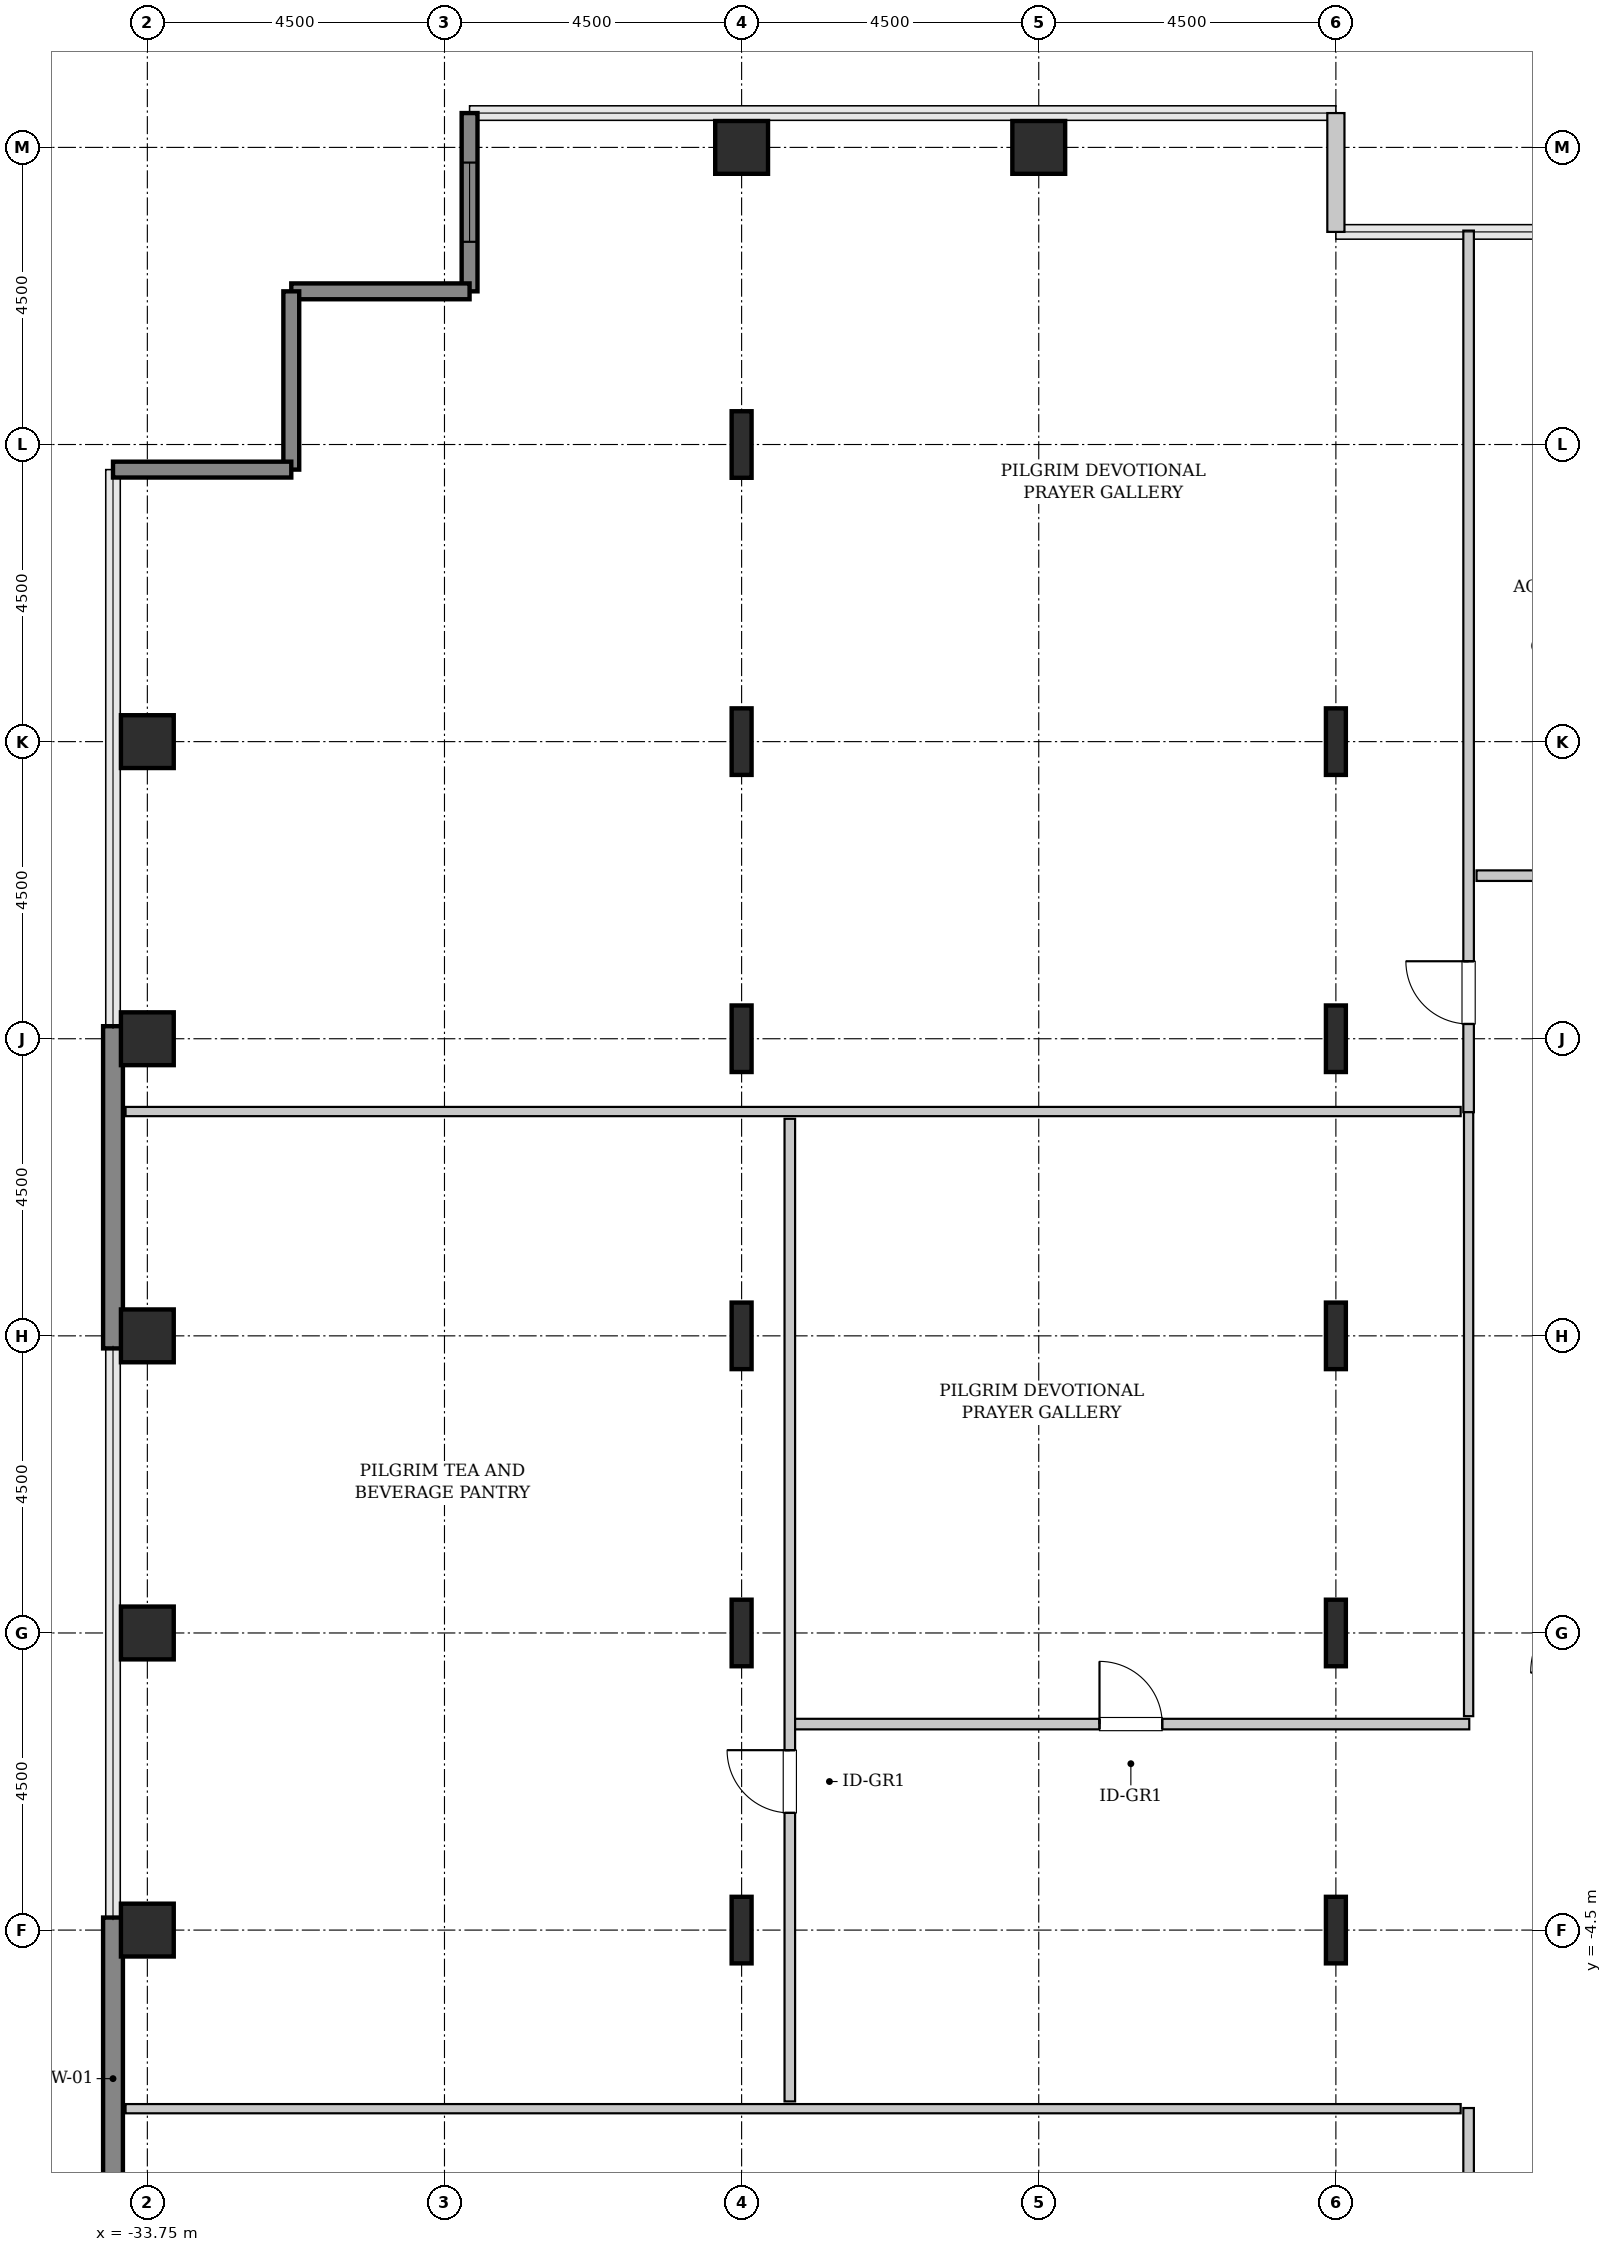
"""IFC4 building model, lengths in metres.
Left out: names, types, materials, properties, quantities, classifications, styles, units other than length and angle.
Written with IfcOpenShell. Run it as: python <this file> out.ifc"""

import sys

from ifc_helpers import new_model, si_unit, direction, frame, frame_2d, origin, origin_2d, place, context, subcontext, project, spatial, rectangle, hollow_rectangle, i_section, extrude, source, transform, mapped, element, fill, save


model = new_model("IFC4")
c1 = context("Model", 3, precision=1e-05, world=origin(), true_north=direction((0.0, 1.0)))
c2 = subcontext(c1, "Body", "Model", "MODEL_VIEW")
j1 = project(units=[si_unit("LENGTHUNIT", "METRE"), si_unit("PLANEANGLEUNIT", "RADIAN")], contexts=[c1])
p1 = place(None, origin())
s1 = spatial("IfcSite", under=j1, at=p1, CompositionType="ELEMENT")
p2 = place(p1, origin())
s2 = spatial("IfcBuilding", under=s1, at=p2, CompositionType="ELEMENT")
p3 = place(p2, frame((0.0, 0.0, 136.4)))
s3 = spatial("IfcBuildingStorey", under=s2, at=p3, CompositionType="ELEMENT", Elevation=136.4)
m1 = source(origin(), c2, "Body", "SweptSolid", [
    extrude(hollow_rectangle(XDim=0.8, YDim=0.8, WallThickness=0.04, InnerFilletRadius=0.04, OuterFilletRadius=0.08, at=origin_2d()), origin(), (0.0, 0.0, 1.0), 3.8),
])
for number, where, z_axis, x_axis in (
    (1, (-33.75, -4.5, 0.0), (0.0, 0.0, 1.0), (1.0, 0.0, 0.0)),
    (2, (-33.75, 0.0, 0.0), (0.0, 0.0, 1.0), (1.0, 0.0, 0.0)),
    (3, (-33.75, 4.5, 0.0), (0.0, 0.0, 1.0), (1.0, 0.0, 0.0)),
    (4, (-33.75, 9.0, 0.0), (0.0, 0.0, 1.0), (1.0, 0.0, 0.0)),
    (5, (-33.75, 13.5, 0.0), (0.0, 0.0, 1.0), (1.0, 0.0, 0.0)),
):
    element("IfcColumn", number, at=place(p3, frame(where, z_axis=z_axis, x_axis=x_axis)), inside=s3, PredefinedType="COLUMN", context=c2, shape_type="MappedRepresentation", body=[
        mapped(m1, transform((0.0, 0.0, 0.0), x_axis=(1.0, 0.0, 0.0), y_axis=(0.0, 1.0, 0.0), z_axis=(0.0, 0.0, 1.0), scale=1.0)),
    ])
m2 = source(origin(), c2, "Body", "SweptSolid", [
    extrude(i_section(OverallWidth=0.302, OverallDepth=1.008, WebThickness=0.021, FlangeThickness=0.04, FilletRadius=0.03, at=origin_2d()), origin(), (0.0, 0.0, 1.0), 3.8),
])
for number, where, z_axis, x_axis in (
    (6, (-24.75, -4.5, 0.0), (0.0, 0.0, 1.0), (1.0, 0.0, 0.0)),
    (7, (-24.75, 0.0, 0.0), (0.0, 0.0, 1.0), (1.0, 0.0, 0.0)),
    (8, (-24.75, 4.5, 0.0), (0.0, 0.0, 1.0), (1.0, 0.0, 0.0)),
    (9, (-24.75, 9.0, 0.0), (0.0, 0.0, 1.0), (1.0, 0.0, 0.0)),
    (10, (-24.75, 13.5, 0.0), (0.0, 0.0, 1.0), (1.0, 0.0, 0.0)),
    (11, (-24.75, 18.0, 0.0), (0.0, 0.0, 1.0), (1.0, 0.0, 0.0)),
):
    element("IfcColumn", number, at=place(p3, frame(where, z_axis=z_axis, x_axis=x_axis)), inside=s3, PredefinedType="COLUMN", context=c2, shape_type="MappedRepresentation", body=[
        mapped(m2, transform((0.0, 0.0, 0.0), x_axis=(1.0, 0.0, 0.0), y_axis=(0.0, 1.0, 0.0), z_axis=(0.0, 0.0, 1.0), scale=1.0)),
    ])
for number, where, z_axis, x_axis in (
    (12, (-24.75, 22.5, 0.0), (0.0, 0.0, 1.0), (1.0, 0.0, 0.0)),
    (13, (-20.25, 22.5, 0.0), (0.0, 0.0, 1.0), (1.0, 0.0, 0.0)),
):
    element("IfcColumn", number, at=place(p3, frame(where, z_axis=z_axis, x_axis=x_axis)), inside=s3, PredefinedType="COLUMN", context=c2, shape_type="MappedRepresentation", body=[
        mapped(m1, transform((0.0, 0.0, 0.0), x_axis=(1.0, 0.0, 0.0), y_axis=(0.0, 1.0, 0.0), z_axis=(0.0, 0.0, 1.0), scale=1.0)),
    ])
for number, where, z_axis, x_axis in (
    (14, (-15.75, -4.5, 0.0), (0.0, 0.0, 1.0), (1.0, 0.0, 0.0)),
    (15, (-15.75, 0.0, 0.0), (0.0, 0.0, 1.0), (1.0, 0.0, 0.0)),
    (16, (-15.75, 4.5, 0.0), (0.0, 0.0, 1.0), (1.0, 0.0, 0.0)),
    (17, (-15.75, 9.0, 0.0), (0.0, 0.0, 1.0), (1.0, 0.0, 0.0)),
    (18, (-15.75, 13.5, 0.0), (0.0, 0.0, 1.0), (1.0, 0.0, 0.0)),
):
    element("IfcColumn", number, at=place(p3, frame(where, z_axis=z_axis, x_axis=x_axis)), inside=s3, PredefinedType="COLUMN", context=c2, shape_type="MappedRepresentation", body=[
        mapped(m2, transform((0.0, 0.0, 0.0), x_axis=(1.0, 0.0, 0.0), y_axis=(0.0, 1.0, 0.0), z_axis=(0.0, 0.0, 1.0), scale=1.0)),
    ])
m3 = source(origin(), c2, "Body", "SweptSolid", [
    extrude(rectangle(XDim=4.88, YDim=0.3, at=frame_2d((2.44, 0.0))), origin(), (0.0, 0.0, 1.0), 3.55),
])
for number, where, z_axis, x_axis in (
    (19, (-34.27, -9.19, 0.0), (0.0, 0.0, 1.0), (0.0, 1.0, 0.0)),
    (20, (-34.27, 4.31, 0.0), (0.0, 0.0, 1.0), (0.0, 1.0, 0.0)),
):
    element("IfcWall", number, at=place(p3, frame(where, z_axis=z_axis, x_axis=x_axis)), inside=s3, PredefinedType="SHEAR", context=c2, shape_type="MappedRepresentation", body=[
        mapped(m3, transform((0.0, 0.0, 0.0), x_axis=(1.0, 0.0, 0.0), y_axis=(0.0, 1.0, 0.0), z_axis=(0.0, 0.0, 1.0), scale=1.0)),
    ])
m4 = source(origin(), c2, "Body", "SweptSolid", [
    extrude(rectangle(XDim=1.8, YDim=0.26, at=frame_2d((0.9, 0.0))), origin(), (0.0, 0.0, 1.0), 3.55),
])
p4 = place(p3, frame((-15.75, 21.22, 0.0), z_axis=(0.0, 0.0, 1.0), x_axis=(0.0, 1.0, 0.0)))
e21 = element("IfcWall", 21, at=p4, inside=s3, PredefinedType="SOLIDWALL", context=c2, shape_type="MappedRepresentation", body=[
    mapped(m4, transform((0.0, 0.0, 0.0), x_axis=(1.0, 0.0, 0.0), y_axis=(0.0, 1.0, 0.0), z_axis=(0.0, 0.0, 1.0), scale=1.0)),
])
m5 = source(origin(), c2, "Body", "SweptSolid", [
    extrude(rectangle(XDim=2.7, YDim=0.24, at=frame_2d((1.35, 0.0))), origin(), (0.0, 0.0, 1.0), 3.55),
])
p5 = place(p3, frame((-28.87, 23.02, 0.0), z_axis=(0.0, 0.0, 1.0), x_axis=(0.0, -1.0, 0.0)))
e22 = element("IfcWall", 22, at=p5, inside=s3, PredefinedType="SHEAR", context=c2, shape_type="MappedRepresentation", body=[
    mapped(m5, transform((0.0, 0.0, 0.0), x_axis=(1.0, 0.0, 0.0), y_axis=(0.0, 1.0, 0.0), z_axis=(0.0, 0.0, 1.0), scale=1.0)),
])
p6 = place(p5, frame((0.75, 0.0, 0.85)))
e23 = element("IfcOpeningElement", 23, at=p6, cuts=e22, PredefinedType="OPENING", context=c2, shape_type="SweptSolid", body=[
    extrude(rectangle(XDim=1.2, YDim=1.8, at=frame_2d((0.6, 0.9))), frame((0.0, 0.13, 0.0), z_axis=(0.0, -1.0, 0.0), x_axis=(1.0, 0.0, 0.0)), (0.0, 0.0, 1.0), 0.26),
])
for number, where, z_axis, x_axis in (
    (24, (-28.87, 20.32, 0.0), (0.0, 0.0, 1.0), (-1.0, 0.0, 0.0)),
    (25, (-31.57, 20.32, 0.0), (0.0, 0.0, 1.0), (0.0, -1.0, 0.0)),
    (26, (-31.57, 17.62, 0.0), (0.0, 0.0, 1.0), (-1.0, 0.0, 0.0)),
):
    element("IfcWall", number, at=place(p3, frame(where, z_axis=z_axis, x_axis=x_axis)), inside=s3, PredefinedType="SHEAR", context=c2, shape_type="MappedRepresentation", body=[
        mapped(m5, transform((0.0, 0.0, 0.0), x_axis=(1.0, 0.0, 0.0), y_axis=(0.0, 1.0, 0.0), z_axis=(0.0, 0.0, 1.0), scale=1.0)),
    ])
m6 = source(origin(), c2, "Body", "SweptSolid", [
    extrude(rectangle(XDim=14.045, YDim=0.16, at=frame_2d((7.022, 0.0))), origin(), (0.0, 0.0, 1.0), 3.535),
])
p7 = place(p3, frame((-13.74, -21.24, 0.0), z_axis=(0.0, 0.0, 1.0), x_axis=(0.0, 1.0, 0.0)))
e27 = element("IfcWall", 27, at=p7, inside=s3, PredefinedType="PARTITIONING", context=c2, shape_type="MappedRepresentation", body=[
    mapped(m6, transform((0.0, 0.0, 0.0), x_axis=(1.0, 0.0, 0.0), y_axis=(0.0, 1.0, 0.0), z_axis=(0.0, 0.0, 1.0), scale=1.0)),
])
p8 = place(p7, frame((11.413, 0.0, 0.0)))
e28 = element("IfcOpeningElement", 28, at=p8, cuts=e27, PredefinedType="OPENING", context=c2, shape_type="SweptSolid", body=[
    extrude(rectangle(XDim=0.95, YDim=2.1, at=frame_2d((0.475, 1.05))), frame((0.0, 0.09, 0.0), z_axis=(0.0, -1.0, 0.0), x_axis=(1.0, 0.0, 0.0)), (0.0, 0.0, 1.0), 0.18),
])
m7 = source(origin(), c2, "Body", "SweptSolid", [
    extrude(rectangle(XDim=20.22, YDim=0.14, at=frame_2d((10.11, 0.0))), origin(), (0.0, 0.0, 1.0), 3.535),
])
p9 = place(p3, frame((-34.08, -7.205, 0.0), z_axis=(0.0, 0.0, 1.0), x_axis=(1.0, 0.0, 0.0)))
e29 = element("IfcWall", 29, at=p9, inside=s3, PredefinedType="PARTITIONING", context=c2, shape_type="MappedRepresentation", body=[
    mapped(m7, transform((0.0, 0.0, 0.0), x_axis=(1.0, 0.0, 0.0), y_axis=(0.0, 1.0, 0.0), z_axis=(0.0, 0.0, 1.0), scale=1.0)),
])
m8 = source(origin(), c2, "Body", "SweptSolid", [
    extrude(rectangle(XDim=13.353, YDim=0.16, at=frame_2d((6.676, 0.0))), origin(), (0.0, 0.0, 1.0), 3.535),
])
p10 = place(p3, frame((-13.74, 7.887, 0.0), z_axis=(0.0, 0.0, 1.0), x_axis=(0.0, 1.0, 0.0)))
e30 = element("IfcWall", 30, at=p10, inside=s3, PredefinedType="PARTITIONING", context=c2, shape_type="MappedRepresentation", body=[
    mapped(m8, transform((0.0, 0.0, 0.0), x_axis=(1.0, 0.0, 0.0), y_axis=(0.0, 1.0, 0.0), z_axis=(0.0, 0.0, 1.0), scale=1.0)),
])
p11 = place(p10, frame((1.336, 0.0, 0.0)))
e31 = element("IfcOpeningElement", 31, at=p11, cuts=e30, PredefinedType="OPENING", context=c2, shape_type="SweptSolid", body=[
    extrude(rectangle(XDim=0.95, YDim=2.1, at=frame_2d((0.475, 1.05))), frame((0.0, 0.09, 0.0), z_axis=(0.0, -1.0, 0.0), x_axis=(1.0, 0.0, 0.0)), (0.0, 0.0, 1.0), 0.18),
])
p12 = place(p3, frame((-34.08, 7.897, 0.0), z_axis=(0.0, 0.0, 1.0), x_axis=(1.0, 0.0, 0.0)))
e32 = element("IfcWall", 32, at=p12, inside=s3, PredefinedType="PARTITIONING", context=c2, shape_type="MappedRepresentation", body=[
    mapped(m7, transform((0.0, 0.0, 0.0), x_axis=(1.0, 0.0, 0.0), y_axis=(0.0, 1.0, 0.0), z_axis=(0.0, 0.0, 1.0), scale=1.0)),
])
m9 = source(origin(), c2, "Body", "SweptSolid", [
    extrude(rectangle(XDim=10.25, YDim=0.16, at=frame_2d((5.125, 0.0))), origin(), (0.0, 0.0, 1.0), 3.535),
])
p13 = place(p3, frame((-23.98, -1.38, 0.0), z_axis=(0.0, 0.0, 1.0), x_axis=(1.0, 0.0, 0.0)))
e33 = element("IfcWall", 33, at=p13, inside=s3, PredefinedType="PARTITIONING", context=c2, shape_type="MappedRepresentation", body=[
    mapped(m9, transform((0.0, 0.0, 0.0), x_axis=(1.0, 0.0, 0.0), y_axis=(0.0, 1.0, 0.0), z_axis=(0.0, 0.0, 1.0), scale=1.0)),
])
p14 = place(p13, frame((4.65, 0.0, 0.0)))
e34 = element("IfcOpeningElement", 34, at=p14, cuts=e33, PredefinedType="OPENING", context=c2, shape_type="SweptSolid", body=[
    extrude(rectangle(XDim=0.95, YDim=2.1, at=frame_2d((0.475, 1.05))), frame((0.0, 0.09, 0.0), z_axis=(0.0, -1.0, 0.0), x_axis=(1.0, 0.0, 0.0)), (0.0, 0.0, 1.0), 0.18),
])
m10 = source(origin(), c2, "Body", "SweptSolid", [
    extrude(rectangle(XDim=9.147, YDim=0.14, at=frame_2d((4.574, 0.0))), origin(), (0.0, 0.0, 1.0), 3.535),
])
p15 = place(p3, frame((-13.74, -1.26, 0.0), z_axis=(0.0, 0.0, 1.0), x_axis=(0.0, 1.0, 0.0)))
e35 = element("IfcWall", 35, at=p15, inside=s3, PredefinedType="PARTITIONING", context=c2, shape_type="MappedRepresentation", body=[
    mapped(m10, transform((0.0, 0.0, 0.0), x_axis=(1.0, 0.0, 0.0), y_axis=(0.0, 1.0, 0.0), z_axis=(0.0, 0.0, 1.0), scale=1.0)),
])
m11 = source(origin(), c2, "Body", "SweptSolid", [
    extrude(rectangle(XDim=14.883, YDim=0.16, at=frame_2d((7.441, 0.0))), origin(), (0.0, 0.0, 1.0), 3.535),
])
p16 = place(p3, frame((-24.02, -7.095, 0.0), z_axis=(0.0, 0.0, 1.0), x_axis=(0.0, 1.0, 0.0)))
e36 = element("IfcWall", 36, at=p16, inside=s3, PredefinedType="PARTITIONING", context=c2, shape_type="MappedRepresentation", body=[
    mapped(m11, transform((0.0, 0.0, 0.0), x_axis=(1.0, 0.0, 0.0), y_axis=(0.0, 1.0, 0.0), z_axis=(0.0, 0.0, 1.0), scale=1.0)),
])
p17 = place(p16, frame((4.37, 0.0, 0.0)))
e37 = element("IfcOpeningElement", 37, at=p17, cuts=e36, PredefinedType="OPENING", context=c2, shape_type="SweptSolid", body=[
    extrude(rectangle(XDim=0.95, YDim=2.1, at=frame_2d((0.475, 1.05))), frame((0.0, 0.09, 0.0), z_axis=(0.0, -1.0, 0.0), x_axis=(1.0, 0.0, 0.0)), (0.0, 0.0, 1.0), 0.18),
])
m12 = source(origin(), c2, "Body", "SweptSolid", [
    extrude(rectangle(XDim=4.125, YDim=0.16, at=frame_2d((2.062, 0.0))), origin(), (0.0, 0.0, 1.0), 3.535),
])
p18 = place(p3, frame((-13.62, 11.47, 0.0), z_axis=(0.0, 0.0, 1.0), x_axis=(1.0, 0.0, 0.0)))
e38 = element("IfcWall", 38, at=p18, inside=s3, PredefinedType="PARTITIONING", context=c2, shape_type="MappedRepresentation", body=[
    mapped(m12, transform((0.0, 0.0, 0.0), x_axis=(1.0, 0.0, 0.0), y_axis=(0.0, 1.0, 0.0), z_axis=(0.0, 0.0, 1.0), scale=1.0)),
])
p19 = place(p18, frame((1.587, 0.0, 0.0)))
e39 = element("IfcOpeningElement", 39, at=p19, cuts=e38, PredefinedType="OPENING", context=c2, shape_type="SweptSolid", body=[
    extrude(rectangle(XDim=0.95, YDim=2.1, at=frame_2d((0.475, 1.05))), frame((0.0, 0.09, 0.0), z_axis=(0.0, -1.0, 0.0), x_axis=(1.0, 0.0, 0.0)), (0.0, 0.0, 1.0), 0.18),
])
m13 = source(origin(), c2, "Body", "SweptSolid", [
    extrude(rectangle(XDim=1.2, YDim=1.8, at=frame_2d((0.6, 0.9))), frame((0.0, 0.03, 0.0), z_axis=(0.0, -1.0, 0.0), x_axis=(1.0, 0.0, 0.0)), (0.0, 0.0, 1.0), 0.06),
])
p20 = place(p6, origin())
e40 = element("IfcWindow", 40, at=p20, inside=s3, PartitioningType="SINGLE_PANEL", PredefinedType="WINDOW", context=c2, shape_type="MappedRepresentation", body=[
    mapped(m13, transform((0.0, 0.0, 0.0), x_axis=(1.0, 0.0, 0.0), y_axis=(0.0, 1.0, 0.0), z_axis=(0.0, 0.0, 1.0), scale=1.0)),
])
fill(e23, e40)
m14 = source(origin(), c2, "Body", "SweptSolid", [
    extrude(rectangle(XDim=0.95, YDim=2.1, at=frame_2d((0.475, 1.05))), frame((0.0, 0.025, 0.0), z_axis=(0.0, -1.0, 0.0), x_axis=(1.0, 0.0, 0.0)), (0.0, 0.0, 1.0), 0.05),
])
p21 = place(p11, origin())
e41 = element("IfcDoor", 41, at=p21, inside=s3, OperationType="SINGLE_SWING_RIGHT", PredefinedType="DOOR", context=c2, shape_type="MappedRepresentation", body=[
    mapped(m14, transform((0.0, 0.0, 0.0), x_axis=(1.0, 0.0, 0.0), y_axis=(0.0, 1.0, 0.0), z_axis=(0.0, 0.0, 1.0), scale=1.0)),
])
fill(e31, e41)
p22 = place(p14, origin())
e42 = element("IfcDoor", 42, at=p22, inside=s3, OperationType="SINGLE_SWING_LEFT", PredefinedType="DOOR", context=c2, shape_type="MappedRepresentation", body=[
    mapped(m14, transform((0.0, 0.0, 0.0), x_axis=(1.0, 0.0, 0.0), y_axis=(0.0, 1.0, 0.0), z_axis=(0.0, 0.0, 1.0), scale=1.0)),
])
fill(e34, e42)
p23 = place(p17, origin())
e43 = element("IfcDoor", 43, at=p23, inside=s3, OperationType="SINGLE_SWING_RIGHT", PredefinedType="DOOR", context=c2, shape_type="MappedRepresentation", body=[
    mapped(m14, transform((0.0, 0.0, 0.0), x_axis=(1.0, 0.0, 0.0), y_axis=(0.0, 1.0, 0.0), z_axis=(0.0, 0.0, 1.0), scale=1.0)),
])
fill(e37, e43)
save(model, sys.argv[1])
